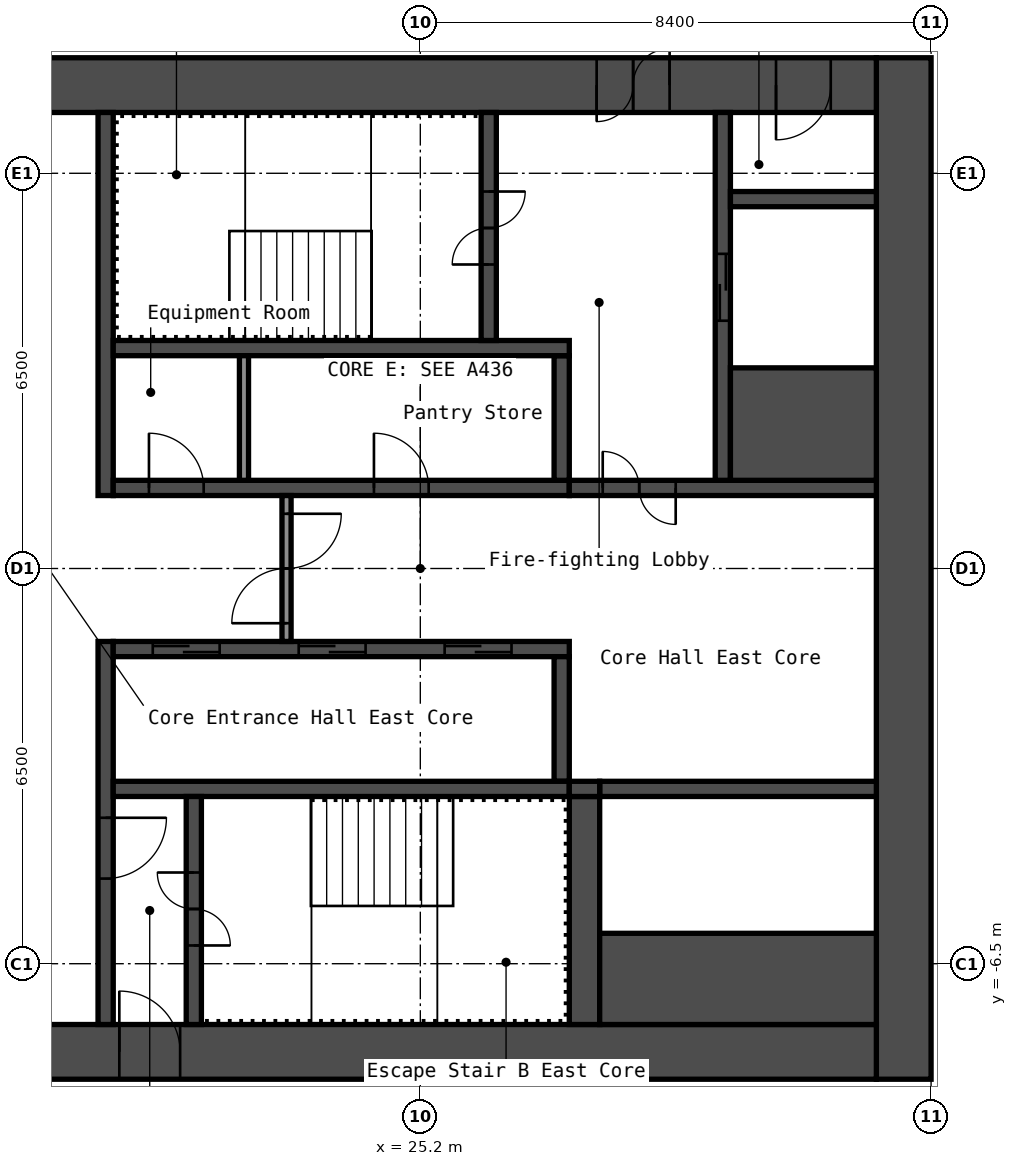
"""IFC4 building model, lengths in metres.
Left out: names, types, materials, properties, quantities, classifications, styles, units other than length and angle.
Written with IfcOpenShell. Run it as: python <this file> out.ifc"""

import sys

from ifc_helpers import new_model, si_unit, direction, frame, frame_2d, origin, place, context, subcontext, project, spatial, rectangle, extrude, element, fill, save


model = new_model("IFC4")
c1 = context("Model", 3, precision=1e-05, world=origin(), true_north=direction((0.0, 1.0)))
c2 = subcontext(c1, "Body", "Model", "MODEL_VIEW")
j1 = project(units=[si_unit("LENGTHUNIT", "METRE"), si_unit("PLANEANGLEUNIT", "RADIAN")], contexts=[c1])
p1 = place(None, origin())
s1 = spatial("IfcSite", under=j1, at=p1, CompositionType="ELEMENT")
p2 = place(p1, origin())
s2 = spatial("IfcBuilding", under=s1, at=p2, CompositionType="ELEMENT")
p3 = place(p2, frame((0.0, 0.0, 251.8)))
s3 = spatial("IfcBuildingStorey", under=s2, at=p3, CompositionType="ELEMENT", Elevation=251.8)
p4 = place(p3, frame((33.15, -8.4, 0.0), z_axis=(0.0, 0.0, 1.0), x_axis=(0.0, 1.0, 0.0)))
e1 = element("IfcWall", 1, at=p4, inside=s3, PredefinedType="SHEAR", context=c2, shape_type="SweptSolid", body=[
    extrude(rectangle(XDim=16.8, YDim=0.9, at=frame_2d((8.4, 0.0))), origin(), (0.0, 0.0, 1.0), 2.75),
])
p5 = place(p3, frame((17.7, 7.95, 0.0), z_axis=(0.0, 0.0, 1.0), x_axis=(1.0, 0.0, 0.0)))
e2 = element("IfcWall", 2, at=p5, inside=s3, PredefinedType="SHEAR", context=c2, shape_type="SweptSolid", body=[
    extrude(rectangle(XDim=15.0, YDim=0.9, at=frame_2d((7.5, 0.0))), origin(), (0.0, 0.0, 1.0), 2.75),
])
p6 = place(p5, frame((10.4, 0.0, 0.0)))
e3 = element("IfcOpeningElement", 3, at=p6, cuts=e2, PredefinedType="OPENING", context=c2, shape_type="SweptSolid", body=[
    extrude(rectangle(XDim=1.2, YDim=2.1, at=frame_2d((0.6, 1.05))), frame((0.0, 0.46, 0.0), z_axis=(0.0, -1.0, 0.0), x_axis=(1.0, 0.0, 0.0)), (0.0, 0.0, 1.0), 0.92),
])
p7 = place(p5, frame((13.35, 0.0, 0.0)))
e4 = element("IfcOpeningElement", 4, at=p7, cuts=e2, PredefinedType="OPENING", context=c2, shape_type="SweptSolid", body=[
    extrude(rectangle(XDim=0.9, YDim=2.1, at=frame_2d((0.45, 1.05))), frame((0.0, 0.46, 0.0), z_axis=(0.0, -1.0, 0.0), x_axis=(1.0, 0.0, 0.0)), (0.0, 0.0, 1.0), 0.92),
])
p8 = place(p3, frame((17.7, -7.95, 0.0), z_axis=(0.0, 0.0, 1.0), x_axis=(1.0, 0.0, 0.0)))
e5 = element("IfcWall", 5, at=p8, inside=s3, PredefinedType="SHEAR", context=c2, shape_type="SweptSolid", body=[
    extrude(rectangle(XDim=15.0, YDim=0.9, at=frame_2d((7.5, 0.0))), origin(), (0.0, 0.0, 1.0), 2.75),
])
p9 = place(p8, frame((2.55, 0.0, 0.0)))
e6 = element("IfcOpeningElement", 6, at=p9, cuts=e5, PredefinedType="OPENING", context=c2, shape_type="SweptSolid", body=[
    extrude(rectangle(XDim=1.0, YDim=2.1, at=frame_2d((0.5, 1.05))), frame((0.0, 0.46, 0.0), z_axis=(0.0, -1.0, 0.0), x_axis=(1.0, 0.0, 0.0)), (0.0, 0.0, 1.0), 0.92),
])
p10 = place(p3, frame((20.025, 1.2, 0.0), z_axis=(0.0, 0.0, 1.0), x_axis=(0.0, 1.0, 0.0)))
e7 = element("IfcWall", 7, at=p10, inside=s3, PredefinedType="SHEAR", context=c2, shape_type="SweptSolid", body=[
    extrude(rectangle(XDim=6.3, YDim=0.25, at=frame_2d((3.15, 0.0))), origin(), (0.0, 0.0, 1.0), 2.75),
])
p11 = place(p3, frame((20.025, -7.5, 0.0), z_axis=(0.0, 0.0, 1.0), x_axis=(0.0, 1.0, 0.0)))
e8 = element("IfcWall", 8, at=p11, inside=s3, PredefinedType="SHEAR", context=c2, shape_type="SweptSolid", body=[
    extrude(rectangle(XDim=6.3, YDim=0.25, at=frame_2d((3.15, 0.0))), origin(), (0.0, 0.0, 1.0), 2.75),
])
p12 = place(p11, frame((2.4, 0.0, 0.0)))
e9 = element("IfcOpeningElement", 9, at=p12, cuts=e8, PredefinedType="OPENING", context=c2, shape_type="SweptSolid", body=[
    extrude(rectangle(XDim=1.0, YDim=2.1, at=frame_2d((0.5, 1.05))), frame((0.0, 0.135, 0.0), z_axis=(0.0, -1.0, 0.0), x_axis=(1.0, 0.0, 0.0)), (0.0, 0.0, 1.0), 0.27),
])
p13 = place(p3, frame((20.15, 1.325, 0.0), z_axis=(0.0, 0.0, 1.0), x_axis=(1.0, 0.0, 0.0)))
e10 = element("IfcWall", 10, at=p13, inside=s3, PredefinedType="SHEAR", context=c2, shape_type="SweptSolid", body=[
    extrude(rectangle(XDim=7.5, YDim=0.25, at=frame_2d((3.75, 0.0))), origin(), (0.0, 0.0, 1.0), 2.75),
])
p14 = place(p13, frame((0.587, 0.0, 0.0)))
e11 = element("IfcOpeningElement", 11, at=p14, cuts=e10, PredefinedType="OPENING", context=c2, shape_type="SweptSolid", body=[
    extrude(rectangle(XDim=0.9, YDim=2.1, at=frame_2d((0.45, 1.05))), frame((0.0, 0.135, 0.0), z_axis=(0.0, -1.0, 0.0), x_axis=(1.0, 0.0, 0.0)), (0.0, 0.0, 1.0), 0.27),
])
p15 = place(p13, frame((4.288, 0.0, 0.0)))
e12 = element("IfcOpeningElement", 12, at=p15, cuts=e10, PredefinedType="OPENING", context=c2, shape_type="SweptSolid", body=[
    extrude(rectangle(XDim=0.9, YDim=2.1, at=frame_2d((0.45, 1.05))), frame((0.0, 0.135, 0.0), z_axis=(0.0, -1.0, 0.0), x_axis=(1.0, 0.0, 0.0)), (0.0, 0.0, 1.0), 0.27),
])
p16 = place(p3, frame((27.525, 1.45, 0.0), z_axis=(0.0, 0.0, 1.0), x_axis=(0.0, 1.0, 0.0)))
e13 = element("IfcWall", 13, at=p16, inside=s3, PredefinedType="SHEAR", context=c2, shape_type="SweptSolid", body=[
    extrude(rectangle(XDim=2.05, YDim=0.25, at=frame_2d((1.025, 0.0))), origin(), (0.0, 0.0, 1.0), 2.75),
])
p17 = place(p3, frame((20.15, 3.625, 0.0), z_axis=(0.0, 0.0, 1.0), x_axis=(1.0, 0.0, 0.0)))
e14 = element("IfcWall", 14, at=p17, inside=s3, PredefinedType="SHEAR", context=c2, shape_type="SweptSolid", body=[
    extrude(rectangle(XDim=7.5, YDim=0.25, at=frame_2d((3.75, 0.0))), origin(), (0.0, 0.0, 1.0), 2.75),
])
p18 = place(p3, frame((26.325, 3.75, 0.0), z_axis=(0.0, 0.0, 1.0), x_axis=(0.0, 1.0, 0.0)))
e15 = element("IfcWall", 15, at=p18, inside=s3, PredefinedType="SHEAR", context=c2, shape_type="SweptSolid", body=[
    extrude(rectangle(XDim=3.75, YDim=0.25, at=frame_2d((1.875, 0.0))), origin(), (0.0, 0.0, 1.0), 2.75),
])
p19 = place(p18, frame((1.25, 0.0, 0.0)))
e16 = element("IfcOpeningElement", 16, at=p19, cuts=e15, PredefinedType="OPENING", context=c2, shape_type="SweptSolid", body=[
    extrude(rectangle(XDim=1.2, YDim=2.1, at=frame_2d((0.6, 1.05))), frame((0.0, 0.135, 0.0), z_axis=(0.0, -1.0, 0.0), x_axis=(1.0, 0.0, 0.0)), (0.0, 0.0, 1.0), 0.27),
])
p20 = place(p3, frame((27.65, 1.325, 0.0), z_axis=(0.0, 0.0, 1.0), x_axis=(1.0, 0.0, 0.0)))
e17 = element("IfcWall", 17, at=p20, inside=s3, PredefinedType="SHEAR", context=c2, shape_type="SweptSolid", body=[
    extrude(rectangle(XDim=5.05, YDim=0.25, at=frame_2d((2.525, 0.0))), origin(), (0.0, 0.0, 1.0), 2.75),
])
p21 = place(p20, frame((0.55, 0.0, 0.0)))
e18 = element("IfcOpeningElement", 18, at=p21, cuts=e17, PredefinedType="OPENING", context=c2, shape_type="SweptSolid", body=[
    extrude(rectangle(XDim=1.2, YDim=2.1, at=frame_2d((0.6, 1.05))), frame((0.0, 0.135, 0.0), z_axis=(0.0, -1.0, 0.0), x_axis=(1.0, 0.0, 0.0)), (0.0, 0.0, 1.0), 0.27),
])
p22 = place(p3, frame((30.175, 1.45, 0.0), z_axis=(0.0, 0.0, 1.0), x_axis=(0.0, 1.0, 0.0)))
e19 = element("IfcWall", 19, at=p22, inside=s3, PredefinedType="SHEAR", context=c2, shape_type="SweptSolid", body=[
    extrude(rectangle(XDim=6.05, YDim=0.25, at=frame_2d((3.025, 0.0))), origin(), (0.0, 0.0, 1.0), 2.75),
])
p23 = place(p22, frame((2.625, 0.0, 0.0)))
e20 = element("IfcOpeningElement", 20, at=p23, cuts=e19, PredefinedType="OPENING", context=c2, shape_type="SweptSolid", body=[
    extrude(rectangle(XDim=1.1, YDim=2.1, at=frame_2d((0.55, 1.05))), frame((0.0, 0.135, 0.0), z_axis=(0.0, -1.0, 0.0), x_axis=(1.0, 0.0, 0.0)), (0.0, 0.0, 1.0), 0.27),
])
p24 = place(p3, frame((30.3, 2.375, 0.0), z_axis=(0.0, 0.0, 1.0), x_axis=(1.0, 0.0, 0.0)))
e21 = element("IfcWall", 21, at=p24, inside=s3, PredefinedType="SHEAR", context=c2, shape_type="SweptSolid", body=[
    extrude(rectangle(XDim=2.4, YDim=1.85, at=frame_2d((1.2, 0.0))), origin(), (0.0, 0.0, 1.0), 2.75),
])
p25 = place(p3, frame((30.3, 6.075, 0.0), z_axis=(0.0, 0.0, 1.0), x_axis=(1.0, 0.0, 0.0)))
e22 = element("IfcWall", 22, at=p25, inside=s3, PredefinedType="SHEAR", context=c2, shape_type="SweptSolid", body=[
    extrude(rectangle(XDim=2.4, YDim=0.25, at=frame_2d((1.2, 0.0))), origin(), (0.0, 0.0, 1.0), 2.75),
])
p26 = place(p3, frame((20.15, -1.325, 0.0), z_axis=(0.0, 0.0, 1.0), x_axis=(1.0, 0.0, 0.0)))
e23 = element("IfcWall", 23, at=p26, inside=s3, PredefinedType="SHEAR", context=c2, shape_type="SweptSolid", body=[
    extrude(rectangle(XDim=7.5, YDim=0.25, at=frame_2d((3.75, 0.0))), origin(), (0.0, 0.0, 1.0), 2.75),
])
p27 = place(p26, frame((0.65, 0.0, 0.0)))
e24 = element("IfcOpeningElement", 24, at=p27, cuts=e23, PredefinedType="OPENING", context=c2, shape_type="SweptSolid", body=[
    extrude(rectangle(XDim=1.1, YDim=2.1, at=frame_2d((0.55, 1.05))), frame((0.0, 0.135, 0.0), z_axis=(0.0, -1.0, 0.0), x_axis=(1.0, 0.0, 0.0)), (0.0, 0.0, 1.0), 0.27),
])
p28 = place(p26, frame((3.05, 0.0, 0.0)))
e25 = element("IfcOpeningElement", 25, at=p28, cuts=e23, PredefinedType="OPENING", context=c2, shape_type="SweptSolid", body=[
    extrude(rectangle(XDim=1.1, YDim=2.1, at=frame_2d((0.55, 1.05))), frame((0.0, 0.135, 0.0), z_axis=(0.0, -1.0, 0.0), x_axis=(1.0, 0.0, 0.0)), (0.0, 0.0, 1.0), 0.27),
])
p29 = place(p26, frame((5.45, 0.0, 0.0)))
e26 = element("IfcOpeningElement", 26, at=p29, cuts=e23, PredefinedType="OPENING", context=c2, shape_type="SweptSolid", body=[
    extrude(rectangle(XDim=1.1, YDim=2.1, at=frame_2d((0.55, 1.05))), frame((0.0, 0.135, 0.0), z_axis=(0.0, -1.0, 0.0), x_axis=(1.0, 0.0, 0.0)), (0.0, 0.0, 1.0), 0.27),
])
p30 = place(p3, frame((27.525, -3.5, 0.0), z_axis=(0.0, 0.0, 1.0), x_axis=(0.0, 1.0, 0.0)))
e27 = element("IfcWall", 27, at=p30, inside=s3, PredefinedType="SHEAR", context=c2, shape_type="SweptSolid", body=[
    extrude(rectangle(XDim=2.05, YDim=0.25, at=frame_2d((1.025, 0.0))), origin(), (0.0, 0.0, 1.0), 2.75),
])
p31 = place(p3, frame((20.15, -3.625, 0.0), z_axis=(0.0, 0.0, 1.0), x_axis=(1.0, 0.0, 0.0)))
e28 = element("IfcWall", 28, at=p31, inside=s3, PredefinedType="SHEAR", context=c2, shape_type="SweptSolid", body=[
    extrude(rectangle(XDim=7.5, YDim=0.25, at=frame_2d((3.75, 0.0))), origin(), (0.0, 0.0, 1.0), 2.75),
])
p32 = place(p3, frame((21.475, -7.5, 0.0), z_axis=(0.0, 0.0, 1.0), x_axis=(0.0, 1.0, 0.0)))
e29 = element("IfcWall", 29, at=p32, inside=s3, PredefinedType="SHEAR", context=c2, shape_type="SweptSolid", body=[
    extrude(rectangle(XDim=3.75, YDim=0.25, at=frame_2d((1.875, 0.0))), origin(), (0.0, 0.0, 1.0), 2.75),
])
p33 = place(p32, frame((1.3, 0.0, 0.0)))
e30 = element("IfcOpeningElement", 30, at=p33, cuts=e29, PredefinedType="OPENING", context=c2, shape_type="SweptSolid", body=[
    extrude(rectangle(XDim=1.2, YDim=2.1, at=frame_2d((0.6, 1.05))), frame((0.0, 0.135, 0.0), z_axis=(0.0, -1.0, 0.0), x_axis=(1.0, 0.0, 0.0)), (0.0, 0.0, 1.0), 0.27),
])
p34 = place(p3, frame((27.9, -7.5, 0.0), z_axis=(0.0, 0.0, 1.0), x_axis=(0.0, 1.0, 0.0)))
e31 = element("IfcWall", 31, at=p34, inside=s3, PredefinedType="SHEAR", context=c2, shape_type="SweptSolid", body=[
    extrude(rectangle(XDim=3.75, YDim=0.5, at=frame_2d((1.875, 0.0))), origin(), (0.0, 0.0, 1.0), 2.75),
])
p35 = place(p3, frame((28.15, -3.625, 0.0), z_axis=(0.0, 0.0, 1.0), x_axis=(1.0, 0.0, 0.0)))
e32 = element("IfcWall", 32, at=p35, inside=s3, PredefinedType="SHEAR", context=c2, shape_type="SweptSolid", body=[
    extrude(rectangle(XDim=4.55, YDim=0.25, at=frame_2d((2.275, 0.0))), origin(), (0.0, 0.0, 1.0), 2.75),
])
p36 = place(p3, frame((28.15, -6.75, 0.0), z_axis=(0.0, 0.0, 1.0), x_axis=(1.0, 0.0, 0.0)))
e33 = element("IfcWall", 33, at=p36, inside=s3, PredefinedType="SHEAR", context=c2, shape_type="SweptSolid", body=[
    extrude(rectangle(XDim=4.55, YDim=1.5, at=frame_2d((2.275, 0.0))), origin(), (0.0, 0.0, 1.0), 2.75),
])
p37 = place(p3, frame((27.65, -3.625, 0.0), z_axis=(0.0, 0.0, 1.0), x_axis=(1.0, 0.0, 0.0)))
e34 = element("IfcWall", 34, at=p37, inside=s3, PredefinedType="SHEAR", context=c2, shape_type="SweptSolid", body=[
    extrude(rectangle(XDim=0.5, YDim=0.25, at=frame_2d((0.25, 0.0))), origin(), (0.0, 0.0, 1.0), 2.75),
])
p38 = place(p3, frame((23.0, -1.2, 0.0), z_axis=(0.0, 0.0, 1.0), x_axis=(0.0, 1.0, 0.0)))
e35 = element("IfcWall", 35, at=p38, inside=s3, PredefinedType="PARTITIONING", context=c2, shape_type="SweptSolid", body=[
    extrude(rectangle(XDim=2.4, YDim=0.15, at=frame_2d((1.2, 0.0))), origin(), (0.0, 0.0, 1.0), 2.75),
])
p39 = place(p38, frame((0.3, 0.0, 0.0)))
e36 = element("IfcOpeningElement", 36, at=p39, cuts=e35, PredefinedType="OPENING", context=c2, shape_type="SweptSolid", body=[
    extrude(rectangle(XDim=1.8, YDim=2.1, at=frame_2d((0.9, 1.05))), frame((0.0, 0.085, 0.0), z_axis=(0.0, -1.0, 0.0), x_axis=(1.0, 0.0, 0.0)), (0.0, 0.0, 1.0), 0.17),
])
p40 = place(p3, frame((22.3, 1.45, 0.0), z_axis=(0.0, 0.0, 1.0), x_axis=(0.0, 1.0, 0.0)))
e37 = element("IfcWall", 37, at=p40, inside=s3, PredefinedType="PARTITIONING", context=c2, shape_type="SweptSolid", body=[
    extrude(rectangle(XDim=2.05, YDim=0.15, at=frame_2d((1.025, 0.0))), origin(), (0.0, 0.0, 1.0), 2.75),
])
p41 = place(p6, origin())
e38 = element("IfcDoor", 38, at=p41, inside=s3, OperationType="DOUBLE_DOOR_SINGLE_SWING", PredefinedType="DOOR", context=c2, shape_type="SweptSolid", body=[
    extrude(rectangle(XDim=1.2, YDim=2.1, at=frame_2d((0.6, 1.05))), frame((0.0, 0.025, 0.0), z_axis=(0.0, -1.0, 0.0), x_axis=(1.0, 0.0, 0.0)), (0.0, 0.0, 1.0), 0.05),
])
fill(e3, e38)
p42 = place(p7, origin())
e39 = element("IfcDoor", 39, at=p42, inside=s3, OperationType="SINGLE_SWING_LEFT", PredefinedType="DOOR", context=c2, shape_type="SweptSolid", body=[
    extrude(rectangle(XDim=0.9, YDim=2.1, at=frame_2d((0.45, 1.05))), frame((0.0, 0.025, 0.0), z_axis=(0.0, -1.0, 0.0), x_axis=(1.0, 0.0, 0.0)), (0.0, 0.0, 1.0), 0.05),
])
fill(e4, e39)
p43 = place(p9, origin())
e40 = element("IfcDoor", 40, at=p43, inside=s3, OperationType="SINGLE_SWING_RIGHT", PredefinedType="DOOR", context=c2, shape_type="SweptSolid", body=[
    extrude(rectangle(XDim=1.0, YDim=2.1, at=frame_2d((0.5, 1.05))), frame((0.0, 0.025, 0.0), z_axis=(0.0, -1.0, 0.0), x_axis=(1.0, 0.0, 0.0)), (0.0, 0.0, 1.0), 0.05),
])
fill(e6, e40)
p44 = place(p19, origin())
e41 = element("IfcDoor", 41, at=p44, inside=s3, OperationType="DOUBLE_DOOR_SINGLE_SWING", PredefinedType="DOOR", context=c2, shape_type="SweptSolid", body=[
    extrude(rectangle(XDim=1.2, YDim=2.1, at=frame_2d((0.6, 1.05))), frame((0.0, 0.025, 0.0), z_axis=(0.0, -1.0, 0.0), x_axis=(1.0, 0.0, 0.0)), (0.0, 0.0, 1.0), 0.05),
])
fill(e16, e41)
p45 = place(p33, origin())
e42 = element("IfcDoor", 42, at=p45, inside=s3, OperationType="DOUBLE_DOOR_SINGLE_SWING", PredefinedType="DOOR", context=c2, shape_type="SweptSolid", body=[
    extrude(rectangle(XDim=1.2, YDim=2.1, at=frame_2d((0.6, 1.05))), frame((0.0, 0.025, 0.0), z_axis=(0.0, -1.0, 0.0), x_axis=(1.0, 0.0, 0.0)), (0.0, 0.0, 1.0), 0.05),
])
fill(e30, e42)
p46 = place(p12, origin())
e43 = element("IfcDoor", 43, at=p46, inside=s3, OperationType="SINGLE_SWING_RIGHT", PredefinedType="DOOR", context=c2, shape_type="SweptSolid", body=[
    extrude(rectangle(XDim=1.0, YDim=2.1, at=frame_2d((0.5, 1.05))), frame((0.0, 0.025, 0.0), z_axis=(0.0, -1.0, 0.0), x_axis=(1.0, 0.0, 0.0)), (0.0, 0.0, 1.0), 0.05),
])
fill(e9, e43)
p47 = place(p21, origin())
e44 = element("IfcDoor", 44, at=p47, inside=s3, OperationType="DOUBLE_DOOR_SINGLE_SWING", PredefinedType="DOOR", context=c2, shape_type="SweptSolid", body=[
    extrude(rectangle(XDim=1.2, YDim=2.1, at=frame_2d((0.6, 1.05))), frame((0.0, 0.025, 0.0), z_axis=(0.0, -1.0, 0.0), x_axis=(1.0, 0.0, 0.0)), (0.0, 0.0, 1.0), 0.05),
])
fill(e18, e44)
p48 = place(p39, origin())
e45 = element("IfcDoor", 45, at=p48, inside=s3, OperationType="DOUBLE_DOOR_SINGLE_SWING", PredefinedType="DOOR", context=c2, shape_type="SweptSolid", body=[
    extrude(rectangle(XDim=1.8, YDim=2.1, at=frame_2d((0.9, 1.05))), frame((0.0, 0.025, 0.0), z_axis=(0.0, -1.0, 0.0), x_axis=(1.0, 0.0, 0.0)), (0.0, 0.0, 1.0), 0.05),
])
fill(e36, e45)
p49 = place(p14, origin())
e46 = element("IfcDoor", 46, at=p49, inside=s3, OperationType="SINGLE_SWING_RIGHT", PredefinedType="DOOR", context=c2, shape_type="SweptSolid", body=[
    extrude(rectangle(XDim=0.9, YDim=2.1, at=frame_2d((0.45, 1.05))), frame((0.0, 0.025, 0.0), z_axis=(0.0, -1.0, 0.0), x_axis=(1.0, 0.0, 0.0)), (0.0, 0.0, 1.0), 0.05),
])
fill(e11, e46)
p50 = place(p15, origin())
e47 = element("IfcDoor", 47, at=p50, inside=s3, OperationType="SINGLE_SWING_RIGHT", PredefinedType="DOOR", context=c2, shape_type="SweptSolid", body=[
    extrude(rectangle(XDim=0.9, YDim=2.1, at=frame_2d((0.45, 1.05))), frame((0.0, 0.025, 0.0), z_axis=(0.0, -1.0, 0.0), x_axis=(1.0, 0.0, 0.0)), (0.0, 0.0, 1.0), 0.05),
])
fill(e12, e47)
p51 = place(p27, origin())
e48 = element("IfcDoor", 48, at=p51, inside=s3, OperationType="DOUBLE_DOOR_SLIDING", PredefinedType="DOOR", context=c2, shape_type="SweptSolid", body=[
    extrude(rectangle(XDim=1.1, YDim=2.1, at=frame_2d((0.55, 1.05))), frame((0.0, 0.025, 0.0), z_axis=(0.0, -1.0, 0.0), x_axis=(1.0, 0.0, 0.0)), (0.0, 0.0, 1.0), 0.05),
])
fill(e24, e48)
p52 = place(p28, origin())
e49 = element("IfcDoor", 49, at=p52, inside=s3, OperationType="DOUBLE_DOOR_SLIDING", PredefinedType="DOOR", context=c2, shape_type="SweptSolid", body=[
    extrude(rectangle(XDim=1.1, YDim=2.1, at=frame_2d((0.55, 1.05))), frame((0.0, 0.025, 0.0), z_axis=(0.0, -1.0, 0.0), x_axis=(1.0, 0.0, 0.0)), (0.0, 0.0, 1.0), 0.05),
])
fill(e25, e49)
p53 = place(p29, origin())
e50 = element("IfcDoor", 50, at=p53, inside=s3, OperationType="DOUBLE_DOOR_SLIDING", PredefinedType="DOOR", context=c2, shape_type="SweptSolid", body=[
    extrude(rectangle(XDim=1.1, YDim=2.1, at=frame_2d((0.55, 1.05))), frame((0.0, 0.025, 0.0), z_axis=(0.0, -1.0, 0.0), x_axis=(1.0, 0.0, 0.0)), (0.0, 0.0, 1.0), 0.05),
])
fill(e26, e50)
p54 = place(p23, origin())
e51 = element("IfcDoor", 51, at=p54, inside=s3, OperationType="DOUBLE_DOOR_SLIDING", PredefinedType="DOOR", context=c2, shape_type="SweptSolid", body=[
    extrude(rectangle(XDim=1.1, YDim=2.1, at=frame_2d((0.55, 1.05))), frame((0.0, 0.025, 0.0), z_axis=(0.0, -1.0, 0.0), x_axis=(1.0, 0.0, 0.0)), (0.0, 0.0, 1.0), 0.05),
])
fill(e20, e51)
save(model, sys.argv[1])
